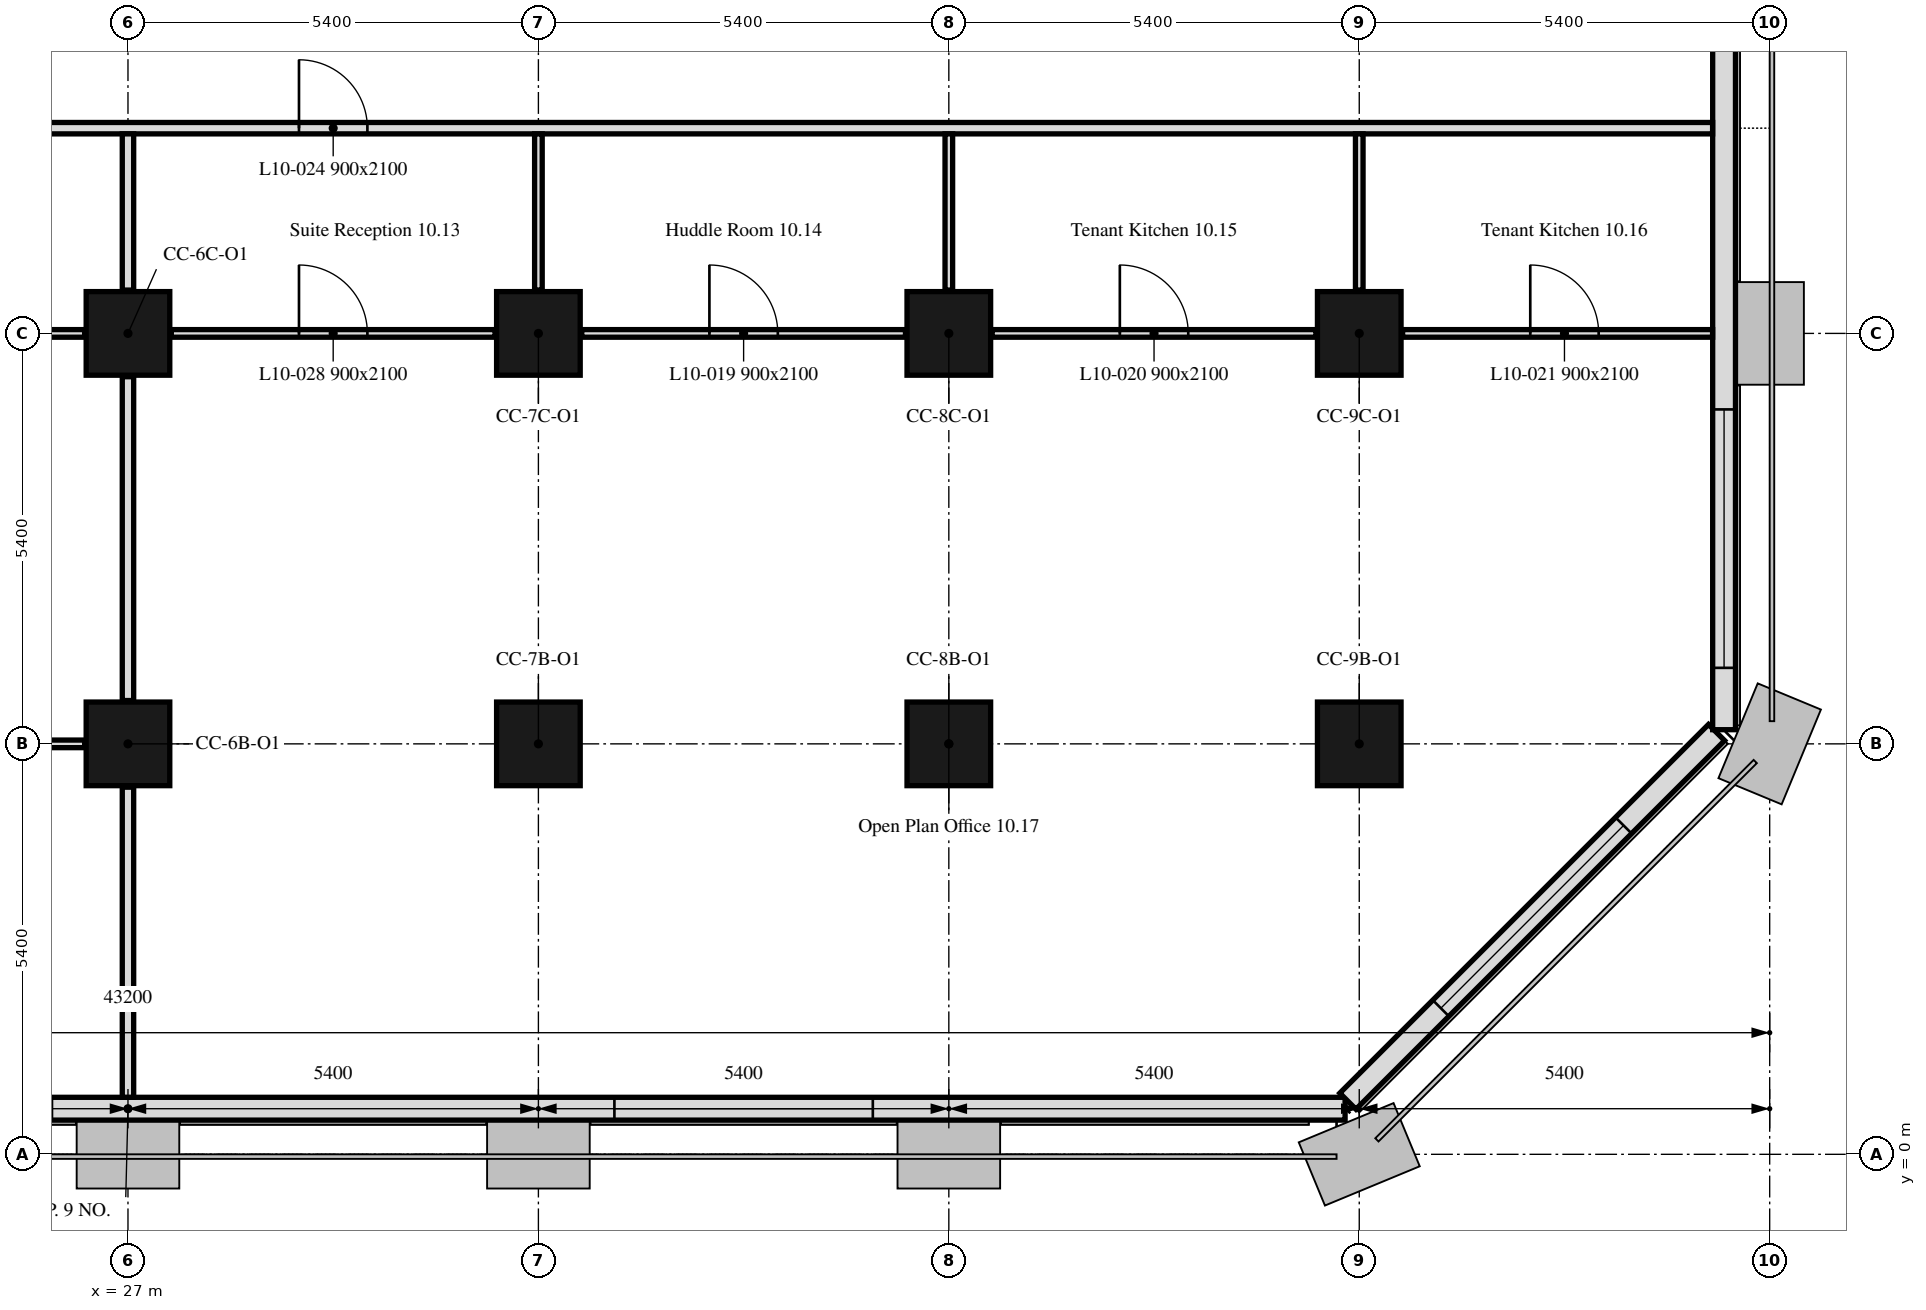
"""IFC4 building model, lengths in metres.
Left out: names, types, materials, properties, quantities, classifications, styles, units other than length and angle.
Written with IfcOpenShell. Run it as: python <this file> out.ifc"""

import sys

from ifc_helpers import new_model, si_unit, direction, frame, frame_2d, origin, origin_2d, place, context, subcontext, project, spatial, rectangle, extrude, element, fill, save


model = new_model("IFC4")
c1 = context("Model", 3, precision=1e-05, world=origin(), true_north=direction((0.0, 1.0)))
c2 = subcontext(c1, "Body", "Model", "MODEL_VIEW")
j1 = project(units=[si_unit("LENGTHUNIT", "METRE"), si_unit("PLANEANGLEUNIT", "RADIAN")], contexts=[c1])
p1 = place(None, origin())
s1 = spatial("IfcSite", under=j1, at=p1, CompositionType="ELEMENT")
p2 = place(p1, origin())
s2 = spatial("IfcBuilding", under=s1, at=p2, CompositionType="ELEMENT")
p3 = place(p2, frame((0.0, 0.0, 48.8)))
s3 = spatial("IfcBuildingStorey", under=s2, at=p3, CompositionType="ELEMENT", Elevation=48.8)
for number, where, z_axis, x_axis in (
    (1, (27.0, 5.4, 0.0), (0.0, 0.0, 1.0), (1.0, 0.0, 0.0)),
    (2, (32.4, 5.4, 0.0), (0.0, 0.0, 1.0), (1.0, 0.0, 0.0)),
    (3, (37.8, 5.4, 0.0), (0.0, 0.0, 1.0), (1.0, 0.0, 0.0)),
    (4, (43.2, 5.4, 0.0), (0.0, 0.0, 1.0), (1.0, 0.0, 0.0)),
    (5, (27.0, 10.8, 0.0), (0.0, 0.0, 1.0), (1.0, 0.0, 0.0)),
    (6, (32.4, 10.8, 0.0), (0.0, 0.0, 1.0), (1.0, 0.0, 0.0)),
    (7, (37.8, 10.8, 0.0), (0.0, 0.0, 1.0), (1.0, 0.0, 0.0)),
    (8, (43.2, 10.8, 0.0), (0.0, 0.0, 1.0), (1.0, 0.0, 0.0)),
):
    element("IfcColumn", number, at=place(p3, frame(where, z_axis=z_axis, x_axis=x_axis)), inside=s3, PredefinedType="COLUMN", context=c2, shape_type="SweptSolid", body=[
        extrude(rectangle(XDim=1.1, YDim=1.1, at=origin_2d()), origin(), (0.0, 0.0, 1.0), 3.5),
    ])
p4 = place(p3, frame((10.986, 0.6, 0.0), z_axis=(0.0, 0.0, 1.0), x_axis=(1.0, 0.0, 0.0)))
e9 = element("IfcWall", 9, at=p4, inside=s3, PredefinedType="SOLIDWALL", context=c2, shape_type="SweptSolid", body=[
    extrude(rectangle(XDim=32.027, YDim=0.3, at=frame_2d((16.014, 0.0))), origin(), (0.0, 0.0, 1.0), 3.5),
])
p5 = place(p4, frame((0.814, 0.0, 0.9)))
e10 = element("IfcOpeningElement", 10, at=p5, cuts=e9, PredefinedType="OPENING", context=c2, shape_type="SweptSolid", body=[
    extrude(rectangle(XDim=3.4, YDim=1.7, at=frame_2d((1.7, 0.85))), frame((0.0, 0.16, 0.0), z_axis=(0.0, -1.0, 0.0), x_axis=(1.0, 0.0, 0.0)), (0.0, 0.0, 1.0), 0.32),
])
p6 = place(p4, frame((11.614, 0.0, 0.9)))
e11 = element("IfcOpeningElement", 11, at=p6, cuts=e9, PredefinedType="OPENING", context=c2, shape_type="SweptSolid", body=[
    extrude(rectangle(XDim=3.4, YDim=1.7, at=frame_2d((1.7, 0.85))), frame((0.0, 0.16, 0.0), z_axis=(0.0, -1.0, 0.0), x_axis=(1.0, 0.0, 0.0)), (0.0, 0.0, 1.0), 0.32),
])
p7 = place(p4, frame((22.414, 0.0, 0.9)))
e12 = element("IfcOpeningElement", 12, at=p7, cuts=e9, PredefinedType="OPENING", context=c2, shape_type="SweptSolid", body=[
    extrude(rectangle(XDim=3.4, YDim=1.7, at=frame_2d((1.7, 0.85))), frame((0.0, 0.16, 0.0), z_axis=(0.0, -1.0, 0.0), x_axis=(1.0, 0.0, 0.0)), (0.0, 0.0, 1.0), 0.32),
])
p8 = place(p3, frame((43.051, 0.699, 0.0), z_axis=(0.0, 0.0, 1.0), x_axis=(0.707106781187, 0.707106781187, 0.0)))
e13 = element("IfcWall", 13, at=p8, inside=s3, PredefinedType="SOLIDWALL", context=c2, shape_type="SweptSolid", body=[
    extrude(rectangle(XDim=6.86, YDim=0.3, at=frame_2d((3.43, 0.0))), origin(), (0.0, 0.0, 1.0), 3.5),
])
p9 = place(p8, frame((1.73, 0.0, 0.9)))
e14 = element("IfcOpeningElement", 14, at=p9, cuts=e13, PredefinedType="OPENING", context=c2, shape_type="SweptSolid", body=[
    extrude(rectangle(XDim=3.4, YDim=1.7, at=frame_2d((1.7, 0.85))), frame((0.0, 0.16, 0.0), z_axis=(0.0, -1.0, 0.0), x_axis=(1.0, 0.0, 0.0)), (0.0, 0.0, 1.0), 0.32),
])
p10 = place(p3, frame((48.0, 5.586, 0.0), z_axis=(0.0, 0.0, 1.0), x_axis=(0.0, 1.0, 0.0)))
e15 = element("IfcWall", 15, at=p10, inside=s3, PredefinedType="SOLIDWALL", context=c2, shape_type="SweptSolid", body=[
    extrude(rectangle(XDim=32.027, YDim=0.3, at=frame_2d((16.014, 0.0))), origin(), (0.0, 0.0, 1.0), 3.5),
])
p11 = place(p10, frame((0.814, 0.0, 0.9)))
e16 = element("IfcOpeningElement", 16, at=p11, cuts=e15, PredefinedType="OPENING", context=c2, shape_type="SweptSolid", body=[
    extrude(rectangle(XDim=3.4, YDim=1.7, at=frame_2d((1.7, 0.85))), frame((0.0, 0.16, 0.0), z_axis=(0.0, -1.0, 0.0), x_axis=(1.0, 0.0, 0.0)), (0.0, 0.0, 1.0), 0.32),
])
p12 = place(p10, frame((11.614, 0.0, 0.9)))
e17 = element("IfcOpeningElement", 17, at=p12, cuts=e15, PredefinedType="OPENING", context=c2, shape_type="SweptSolid", body=[
    extrude(rectangle(XDim=3.4, YDim=1.7, at=frame_2d((1.7, 0.85))), frame((0.0, 0.16, 0.0), z_axis=(0.0, -1.0, 0.0), x_axis=(1.0, 0.0, 0.0)), (0.0, 0.0, 1.0), 0.32),
])
p13 = place(p10, frame((22.414, 0.0, 0.9)))
e18 = element("IfcOpeningElement", 18, at=p13, cuts=e15, PredefinedType="OPENING", context=c2, shape_type="SweptSolid", body=[
    extrude(rectangle(XDim=3.4, YDim=1.7, at=frame_2d((1.7, 0.85))), frame((0.0, 0.16, 0.0), z_axis=(0.0, -1.0, 0.0), x_axis=(1.0, 0.0, 0.0)), (0.0, 0.0, 1.0), 0.32),
])
p14 = place(p3, frame((6.151, 13.5, 0.0), z_axis=(0.0, 0.0, 1.0), x_axis=(1.0, 0.0, 0.0)))
e19 = element("IfcWall", 19, at=p14, inside=s3, PredefinedType="PARTITIONING", context=c2, shape_type="SweptSolid", body=[
    extrude(rectangle(XDim=41.698, YDim=0.15, at=frame_2d((20.849, 0.0))), origin(), (0.0, 0.0, 1.0), 2.75),
])
p15 = place(p14, frame((2.174, 0.0, 0.0)))
e20 = element("IfcOpeningElement", 20, at=p15, cuts=e19, PredefinedType="OPENING", context=c2, shape_type="SweptSolid", body=[
    extrude(rectangle(XDim=0.9, YDim=2.1, at=frame_2d((0.45, 1.05))), frame((0.0, 0.075, 0.0), z_axis=(0.0, -1.0, 0.0), x_axis=(1.0, 0.0, 0.0)), (0.0, 0.0, 1.0), 0.15),
])
p16 = place(p14, frame((23.099, 0.0, 0.0)))
e21 = element("IfcOpeningElement", 21, at=p16, cuts=e19, PredefinedType="OPENING", context=c2, shape_type="SweptSolid", body=[
    extrude(rectangle(XDim=0.9, YDim=2.1, at=frame_2d((0.45, 1.05))), frame((0.0, 0.075, 0.0), z_axis=(0.0, -1.0, 0.0), x_axis=(1.0, 0.0, 0.0)), (0.0, 0.0, 1.0), 0.15),
])
p17 = place(p3, frame((22.17, 10.8, 0.0), z_axis=(0.0, 0.0, 1.0), x_axis=(1.0, 0.0, 0.0)))
e22 = element("IfcWall", 22, at=p17, inside=s3, PredefinedType="PARTITIONING", context=c2, shape_type="SweptSolid", body=[
    extrude(rectangle(XDim=4.26, YDim=0.1, at=frame_2d((2.13, 0.0))), origin(), (0.0, 0.0, 1.0), 3.5),
])
p18 = place(p17, frame((1.68, 0.0, 0.0)))
e23 = element("IfcOpeningElement", 23, at=p18, cuts=e22, PredefinedType="OPENING", context=c2, shape_type="SweptSolid", body=[
    extrude(rectangle(XDim=0.9, YDim=2.1, at=frame_2d((0.45, 1.05))), frame((0.0, 0.05, 0.0), z_axis=(0.0, -1.0, 0.0), x_axis=(1.0, 0.0, 0.0)), (0.0, 0.0, 1.0), 0.1),
])
p19 = place(p3, frame((27.0, 11.37, 0.0), z_axis=(0.0, 0.0, 1.0), x_axis=(0.0, 1.0, 0.0)))
e24 = element("IfcWall", 24, at=p19, inside=s3, PredefinedType="PARTITIONING", context=c2, shape_type="SweptSolid", body=[
    extrude(rectangle(XDim=2.055, YDim=0.15, at=frame_2d((1.027, 0.0))), origin(), (0.0, 0.0, 1.0), 2.75),
])
p20 = place(p3, frame((22.17, 5.4, 0.0), z_axis=(0.0, 0.0, 1.0), x_axis=(1.0, 0.0, 0.0)))
e25 = element("IfcWall", 25, at=p20, inside=s3, PredefinedType="PARTITIONING", context=c2, shape_type="SweptSolid", body=[
    extrude(rectangle(XDim=4.26, YDim=0.1, at=frame_2d((2.13, 0.0))), origin(), (0.0, 0.0, 1.0), 3.5),
])
p21 = place(p20, frame((1.68, 0.0, 0.0)))
e26 = element("IfcOpeningElement", 26, at=p21, cuts=e25, PredefinedType="OPENING", context=c2, shape_type="SweptSolid", body=[
    extrude(rectangle(XDim=0.9, YDim=2.1, at=frame_2d((0.45, 1.05))), frame((0.0, 0.05, 0.0), z_axis=(0.0, -1.0, 0.0), x_axis=(1.0, 0.0, 0.0)), (0.0, 0.0, 1.0), 0.1),
])
p22 = place(p3, frame((27.0, 5.97, 0.0), z_axis=(0.0, 0.0, 1.0), x_axis=(0.0, 1.0, 0.0)))
e27 = element("IfcWall", 27, at=p22, inside=s3, PredefinedType="PARTITIONING", context=c2, shape_type="SweptSolid", body=[
    extrude(rectangle(XDim=4.26, YDim=0.15, at=frame_2d((2.13, 0.0))), origin(), (0.0, 0.0, 1.0), 2.75),
])
p23 = place(p3, frame((27.0, 0.751, 0.0), z_axis=(0.0, 0.0, 1.0), x_axis=(0.0, 1.0, 0.0)))
e28 = element("IfcWall", 28, at=p23, inside=s3, PredefinedType="PARTITIONING", context=c2, shape_type="SweptSolid", body=[
    extrude(rectangle(XDim=4.079, YDim=0.15, at=frame_2d((2.04, 0.0))), origin(), (0.0, 0.0, 1.0), 2.75),
])
p24 = place(p3, frame((27.57, 10.8, 0.0), z_axis=(0.0, 0.0, 1.0), x_axis=(1.0, 0.0, 0.0)))
e29 = element("IfcWall", 29, at=p24, inside=s3, PredefinedType="PARTITIONING", context=c2, shape_type="SweptSolid", body=[
    extrude(rectangle(XDim=4.26, YDim=0.1, at=frame_2d((2.13, 0.0))), origin(), (0.0, 0.0, 1.0), 3.5),
])
p25 = place(p24, frame((1.68, 0.0, 0.0)))
e30 = element("IfcOpeningElement", 30, at=p25, cuts=e29, PredefinedType="OPENING", context=c2, shape_type="SweptSolid", body=[
    extrude(rectangle(XDim=0.9, YDim=2.1, at=frame_2d((0.45, 1.05))), frame((0.0, 0.05, 0.0), z_axis=(0.0, -1.0, 0.0), x_axis=(1.0, 0.0, 0.0)), (0.0, 0.0, 1.0), 0.1),
])
p26 = place(p3, frame((32.4, 11.37, 0.0), z_axis=(0.0, 0.0, 1.0), x_axis=(0.0, 1.0, 0.0)))
e31 = element("IfcWall", 31, at=p26, inside=s3, PredefinedType="PARTITIONING", context=c2, shape_type="SweptSolid", body=[
    extrude(rectangle(XDim=2.055, YDim=0.1, at=frame_2d((1.027, 0.0))), origin(), (0.0, 0.0, 1.0), 2.75),
])
p27 = place(p3, frame((32.97, 10.8, 0.0), z_axis=(0.0, 0.0, 1.0), x_axis=(1.0, 0.0, 0.0)))
e32 = element("IfcWall", 32, at=p27, inside=s3, PredefinedType="PARTITIONING", context=c2, shape_type="SweptSolid", body=[
    extrude(rectangle(XDim=4.26, YDim=0.1, at=frame_2d((2.13, 0.0))), origin(), (0.0, 0.0, 1.0), 2.75),
])
p28 = place(p27, frame((1.68, 0.0, 0.0)))
e33 = element("IfcOpeningElement", 33, at=p28, cuts=e32, PredefinedType="OPENING", context=c2, shape_type="SweptSolid", body=[
    extrude(rectangle(XDim=0.9, YDim=2.1, at=frame_2d((0.45, 1.05))), frame((0.0, 0.05, 0.0), z_axis=(0.0, -1.0, 0.0), x_axis=(1.0, 0.0, 0.0)), (0.0, 0.0, 1.0), 0.1),
])
p29 = place(p3, frame((37.8, 11.37, 0.0), z_axis=(0.0, 0.0, 1.0), x_axis=(0.0, 1.0, 0.0)))
e34 = element("IfcWall", 34, at=p29, inside=s3, PredefinedType="PARTITIONING", context=c2, shape_type="SweptSolid", body=[
    extrude(rectangle(XDim=2.055, YDim=0.1, at=frame_2d((1.027, 0.0))), origin(), (0.0, 0.0, 1.0), 2.75),
])
p30 = place(p3, frame((38.37, 10.8, 0.0), z_axis=(0.0, 0.0, 1.0), x_axis=(1.0, 0.0, 0.0)))
e35 = element("IfcWall", 35, at=p30, inside=s3, PredefinedType="PARTITIONING", context=c2, shape_type="SweptSolid", body=[
    extrude(rectangle(XDim=4.26, YDim=0.1, at=frame_2d((2.13, 0.0))), origin(), (0.0, 0.0, 1.0), 2.75),
])
p31 = place(p30, frame((1.68, 0.0, 0.0)))
e36 = element("IfcOpeningElement", 36, at=p31, cuts=e35, PredefinedType="OPENING", context=c2, shape_type="SweptSolid", body=[
    extrude(rectangle(XDim=0.9, YDim=2.1, at=frame_2d((0.45, 1.05))), frame((0.0, 0.05, 0.0), z_axis=(0.0, -1.0, 0.0), x_axis=(1.0, 0.0, 0.0)), (0.0, 0.0, 1.0), 0.1),
])
p32 = place(p3, frame((43.2, 11.37, 0.0), z_axis=(0.0, 0.0, 1.0), x_axis=(0.0, 1.0, 0.0)))
e37 = element("IfcWall", 37, at=p32, inside=s3, PredefinedType="PARTITIONING", context=c2, shape_type="SweptSolid", body=[
    extrude(rectangle(XDim=2.055, YDim=0.1, at=frame_2d((1.027, 0.0))), origin(), (0.0, 0.0, 1.0), 3.5),
])
p33 = place(p3, frame((43.77, 10.8, 0.0), z_axis=(0.0, 0.0, 1.0), x_axis=(1.0, 0.0, 0.0)))
e38 = element("IfcWall", 38, at=p33, inside=s3, PredefinedType="PARTITIONING", context=c2, shape_type="SweptSolid", body=[
    extrude(rectangle(XDim=4.079, YDim=0.1, at=frame_2d((2.04, 0.0))), origin(), (0.0, 0.0, 1.0), 2.75),
])
p34 = place(p33, frame((1.68, 0.0, 0.0)))
e39 = element("IfcOpeningElement", 39, at=p34, cuts=e38, PredefinedType="OPENING", context=c2, shape_type="SweptSolid", body=[
    extrude(rectangle(XDim=0.9, YDim=2.1, at=frame_2d((0.45, 1.05))), frame((0.0, 0.05, 0.0), z_axis=(0.0, -1.0, 0.0), x_axis=(1.0, 0.0, 0.0)), (0.0, 0.0, 1.0), 0.1),
])
p35 = place(p7, origin())
e40 = element("IfcWindow", 40, at=p35, inside=s3, PartitioningType="SINGLE_PANEL", PredefinedType="WINDOW", context=c2, shape_type="SweptSolid", body=[
    extrude(rectangle(XDim=3.4, YDim=1.7, at=frame_2d((1.7, 0.85))), frame((0.0, 0.03, 0.0), z_axis=(0.0, -1.0, 0.0), x_axis=(1.0, 0.0, 0.0)), (0.0, 0.0, 1.0), 0.06),
])
fill(e12, e40)
p36 = place(p9, origin())
e41 = element("IfcWindow", 41, at=p36, inside=s3, PartitioningType="SINGLE_PANEL", PredefinedType="WINDOW", context=c2, shape_type="SweptSolid", body=[
    extrude(rectangle(XDim=3.4, YDim=1.7, at=frame_2d((1.7, 0.85))), frame((0.0, 0.03, 0.0), z_axis=(0.0, -1.0, 0.0), x_axis=(1.0, 0.0, 0.0)), (0.0, 0.0, 1.0), 0.06),
])
fill(e14, e41)
p37 = place(p11, origin())
e42 = element("IfcWindow", 42, at=p37, inside=s3, PartitioningType="SINGLE_PANEL", PredefinedType="WINDOW", context=c2, shape_type="SweptSolid", body=[
    extrude(rectangle(XDim=3.4, YDim=1.7, at=frame_2d((1.7, 0.85))), frame((0.0, 0.03, 0.0), z_axis=(0.0, -1.0, 0.0), x_axis=(1.0, 0.0, 0.0)), (0.0, 0.0, 1.0), 0.06),
])
fill(e16, e42)
p38 = place(p28, origin())
e43 = element("IfcDoor", 43, at=p38, inside=s3, OperationType="SINGLE_SWING_RIGHT", PredefinedType="DOOR", context=c2, shape_type="SweptSolid", body=[
    extrude(rectangle(XDim=0.9, YDim=2.1, at=frame_2d((0.45, 1.05))), frame((0.0, 0.025, 0.0), z_axis=(0.0, -1.0, 0.0), x_axis=(1.0, 0.0, 0.0)), (0.0, 0.0, 1.0), 0.05),
])
fill(e33, e43)
p39 = place(p31, origin())
e44 = element("IfcDoor", 44, at=p39, inside=s3, OperationType="SINGLE_SWING_RIGHT", PredefinedType="DOOR", context=c2, shape_type="SweptSolid", body=[
    extrude(rectangle(XDim=0.9, YDim=2.1, at=frame_2d((0.45, 1.05))), frame((0.0, 0.025, 0.0), z_axis=(0.0, -1.0, 0.0), x_axis=(1.0, 0.0, 0.0)), (0.0, 0.0, 1.0), 0.05),
])
fill(e36, e44)
p40 = place(p34, origin())
e45 = element("IfcDoor", 45, at=p40, inside=s3, OperationType="SINGLE_SWING_LEFT", PredefinedType="DOOR", context=c2, shape_type="SweptSolid", body=[
    extrude(rectangle(XDim=0.9, YDim=2.1, at=frame_2d((0.45, 1.05))), frame((0.0, 0.025, 0.0), z_axis=(0.0, -1.0, 0.0), x_axis=(1.0, 0.0, 0.0)), (0.0, 0.0, 1.0), 0.05),
])
fill(e39, e45)
p41 = place(p16, origin())
e46 = element("IfcDoor", 46, at=p41, inside=s3, OperationType="SINGLE_SWING_RIGHT", PredefinedType="DOOR", context=c2, shape_type="SweptSolid", body=[
    extrude(rectangle(XDim=0.9, YDim=2.1, at=frame_2d((0.45, 1.05))), frame((0.0, 0.025, 0.0), z_axis=(0.0, -1.0, 0.0), x_axis=(1.0, 0.0, 0.0)), (0.0, 0.0, 1.0), 0.05),
])
fill(e21, e46)
p42 = place(p25, origin())
e47 = element("IfcDoor", 47, at=p42, inside=s3, OperationType="SINGLE_SWING_LEFT", PredefinedType="DOOR", context=c2, shape_type="SweptSolid", body=[
    extrude(rectangle(XDim=0.9, YDim=2.1, at=frame_2d((0.45, 1.05))), frame((0.0, 0.025, 0.0), z_axis=(0.0, -1.0, 0.0), x_axis=(1.0, 0.0, 0.0)), (0.0, 0.0, 1.0), 0.05),
])
fill(e30, e47)
save(model, sys.argv[1])
